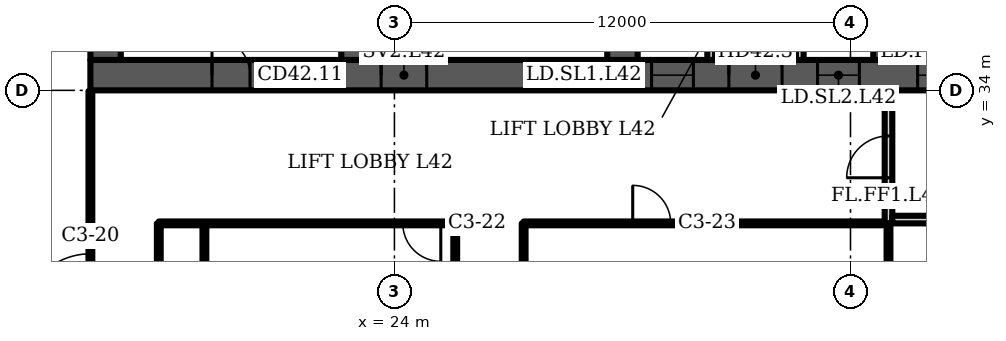
"""IFC4 building model, lengths in metres.
Left out: names, types, materials, properties, quantities, classifications, styles, units other than length and angle.
Written with IfcOpenShell. Run it as: python <this file> out.ifc"""

import sys

from ifc_helpers import new_model, si_unit, direction, frame, frame_2d, origin, place, context, subcontext, project, spatial, polyline, rectangle, outline, extrude, element, fill, save


model = new_model("IFC4")
c1 = context("Model", 3, precision=1e-05, world=origin(), true_north=direction((0.0, 1.0)))
c2 = subcontext(c1, "Body", "Model", "MODEL_VIEW")
j1 = project(units=[si_unit("LENGTHUNIT", "METRE"), si_unit("PLANEANGLEUNIT", "RADIAN")], contexts=[c1])
p1 = place(None, origin())
s1 = spatial("IfcSite", under=j1, at=p1, CompositionType="ELEMENT")
p2 = place(p1, origin())
s2 = spatial("IfcBuilding", under=s1, at=p2, CompositionType="ELEMENT")
p3 = place(p2, frame((0.0, 0.0, 173.5)))
s3 = spatial("IfcBuildingStorey", under=s2, at=p3, CompositionType="ELEMENT", Elevation=173.5)
p4 = place(p3, frame((16.0, 34.4, 0.0), z_axis=(0.0, 0.0, 1.0), x_axis=(1.0, 0.0, 0.0)))
e1 = element("IfcWall", 1, at=p4, inside=s3, PredefinedType="SHEAR", context=c2, shape_type="SweptSolid", body=[
    extrude(rectangle(XDim=42.0, YDim=0.8, at=frame_2d((21.0, 0.0))), origin(), (0.0, 0.0, 1.0), 3.6),
])
p5 = place(p4, frame((3.2, 0.0, 0.0)))
e2 = element("IfcOpeningElement", 2, at=p5, cuts=e1, PredefinedType="OPENING", context=c2, shape_type="SweptSolid", body=[
    extrude(rectangle(XDim=1.0, YDim=2.1, at=frame_2d((0.5, 1.05))), frame((0.0, 0.41, 0.0), z_axis=(0.0, -1.0, 0.0), x_axis=(1.0, 0.0, 0.0)), (0.0, 0.0, 1.0), 0.82),
])
p6 = place(p4, frame((7.65, 0.0, 0.0)))
e3 = element("IfcOpeningElement", 3, at=p6, cuts=e1, PredefinedType="OPENING", context=c2, shape_type="SweptSolid", body=[
    extrude(rectangle(XDim=1.2, YDim=2.1, at=frame_2d((0.6, 1.05))), frame((0.0, 0.41, 0.0), z_axis=(0.0, -1.0, 0.0), x_axis=(1.0, 0.0, 0.0)), (0.0, 0.0, 1.0), 0.82),
])
p7 = place(p4, frame((14.767, 0.0, 0.0)))
e4 = element("IfcOpeningElement", 4, at=p7, cuts=e1, PredefinedType="OPENING", context=c2, shape_type="SweptSolid", body=[
    extrude(rectangle(XDim=1.1, YDim=2.1, at=frame_2d((0.55, 1.05))), frame((0.0, 0.41, 0.0), z_axis=(0.0, -1.0, 0.0), x_axis=(1.0, 0.0, 0.0)), (0.0, 0.0, 1.0), 0.82),
])
p8 = place(p4, frame((19.133, 0.0, 0.0)))
e5 = element("IfcOpeningElement", 5, at=p8, cuts=e1, PredefinedType="OPENING", context=c2, shape_type="SweptSolid", body=[
    extrude(rectangle(XDim=1.1, YDim=2.1, at=frame_2d((0.55, 1.05))), frame((0.0, 0.41, 0.0), z_axis=(0.0, -1.0, 0.0), x_axis=(1.0, 0.0, 0.0)), (0.0, 0.0, 1.0), 0.82),
])
p9 = place(p4, frame((16.8, 0.0, 0.0)))
e6 = element("IfcOpeningElement", 6, at=p9, cuts=e1, PredefinedType="OPENING", context=c2, shape_type="SweptSolid", body=[
    extrude(rectangle(XDim=1.4, YDim=2.1, at=frame_2d((0.7, 1.05))), frame((0.0, 0.41, 0.0), z_axis=(0.0, -1.0, 0.0), x_axis=(1.0, 0.0, 0.0)), (0.0, 0.0, 1.0), 0.82),
])
p10 = place(p4, frame((21.767, 0.0, 0.0)))
e7 = element("IfcOpeningElement", 7, at=p10, cuts=e1, PredefinedType="OPENING", context=c2, shape_type="SweptSolid", body=[
    extrude(rectangle(XDim=1.1, YDim=2.1, at=frame_2d((0.55, 1.05))), frame((0.0, 0.41, 0.0), z_axis=(0.0, -1.0, 0.0), x_axis=(1.0, 0.0, 0.0)), (0.0, 0.0, 1.0), 0.82),
])
p11 = place(p4, frame((23.95, 0.0, 0.0)))
e8 = element("IfcOpeningElement", 8, at=p11, cuts=e1, PredefinedType="OPENING", context=c2, shape_type="SweptSolid", body=[
    extrude(rectangle(XDim=1.1, YDim=2.1, at=frame_2d((0.55, 1.05))), frame((0.0, 0.41, 0.0), z_axis=(0.0, -1.0, 0.0), x_axis=(1.0, 0.0, 0.0)), (0.0, 0.0, 1.0), 0.82),
])
p12 = place(p4, frame((26.133, 0.0, 0.0)))
e9 = element("IfcOpeningElement", 9, at=p12, cuts=e1, PredefinedType="OPENING", context=c2, shape_type="SweptSolid", body=[
    extrude(rectangle(XDim=1.1, YDim=2.1, at=frame_2d((0.55, 1.05))), frame((0.0, 0.41, 0.0), z_axis=(0.0, -1.0, 0.0), x_axis=(1.0, 0.0, 0.0)), (0.0, 0.0, 1.0), 0.82),
])
p13 = place(p4, frame((33.15, 0.0, 0.0)))
e10 = element("IfcOpeningElement", 10, at=p13, cuts=e1, PredefinedType="OPENING", context=c2, shape_type="SweptSolid", body=[
    extrude(rectangle(XDim=1.2, YDim=2.1, at=frame_2d((0.6, 1.05))), frame((0.0, 0.41, 0.0), z_axis=(0.0, -1.0, 0.0), x_axis=(1.0, 0.0, 0.0)), (0.0, 0.0, 1.0), 0.82),
])
p14 = place(p4, frame((35.817, 0.0, 0.0)))
e11 = element("IfcOpeningElement", 11, at=p14, cuts=e1, PredefinedType="OPENING", context=c2, shape_type="SweptSolid", body=[
    extrude(rectangle(XDim=1.0, YDim=2.1, at=frame_2d((0.5, 1.05))), frame((0.0, 0.41, 0.0), z_axis=(0.0, -1.0, 0.0), x_axis=(1.0, 0.0, 0.0)), (0.0, 0.0, 1.0), 0.82),
])
p15 = place(p4, frame((39.95, 0.0, 0.0)))
e12 = element("IfcOpeningElement", 12, at=p15, cuts=e1, PredefinedType="OPENING", context=c2, shape_type="SweptSolid", body=[
    extrude(rectangle(XDim=1.0, YDim=2.1, at=frame_2d((0.5, 1.05))), frame((0.0, 0.41, 0.0), z_axis=(0.0, -1.0, 0.0), x_axis=(1.0, 0.0, 0.0)), (0.0, 0.0, 1.0), 0.82),
])
p16 = place(p4, frame((37.767, 0.0, 0.0)))
e13 = element("IfcOpeningElement", 13, at=p16, cuts=e1, PredefinedType="OPENING", context=c2, shape_type="SweptSolid", body=[
    extrude(rectangle(XDim=1.4, YDim=2.1, at=frame_2d((0.7, 1.05))), frame((0.0, 0.41, 0.0), z_axis=(0.0, -1.0, 0.0), x_axis=(1.0, 0.0, 0.0)), (0.0, 0.0, 1.0), 0.82),
])
p17 = place(p3, frame((16.4, 34.8, 0.0), z_axis=(0.0, 0.0, 1.0), x_axis=(0.0, 1.0, 0.0)))
e14 = element("IfcWall", 14, at=p17, inside=s3, PredefinedType="SHEAR", context=c2, shape_type="SweptSolid", body=[
    extrude(rectangle(XDim=13.184, YDim=0.8, at=frame_2d((6.592, 0.0))), origin(), (0.0, 0.0, 1.0), 3.6),
])
p18 = place(p3, frame((23.0, 34.8, 0.0), z_axis=(0.0, 0.0, 1.0), x_axis=(0.0, 1.0, 0.0)))
e15 = element("IfcWall", 15, at=p18, inside=s3, PredefinedType="SHEAR", context=c2, shape_type="SweptSolid", body=[
    extrude(rectangle(XDim=13.762, YDim=0.8, at=frame_2d((6.881, 0.0))), origin(), (0.0, 0.0, 1.0), 3.6),
])
p19 = place(p18, frame((2.55, 0.0, 0.0)))
e16 = element("IfcOpeningElement", 16, at=p19, cuts=e15, PredefinedType="OPENING", context=c2, shape_type="SweptSolid", body=[
    extrude(rectangle(XDim=1.1, YDim=2.1, at=frame_2d((0.55, 1.05))), frame((0.0, 0.41, 0.0), z_axis=(0.0, -1.0, 0.0), x_axis=(1.0, 0.0, 0.0)), (0.0, 0.0, 1.0), 0.82),
])
p20 = place(p18, frame((10.0, 0.0, 0.0)))
e17 = element("IfcOpeningElement", 17, at=p20, cuts=e15, PredefinedType="OPENING", context=c2, shape_type="SweptSolid", body=[
    extrude(rectangle(XDim=1.0, YDim=2.1, at=frame_2d((0.5, 1.05))), frame((0.0, 0.41, 0.0), z_axis=(0.0, -1.0, 0.0), x_axis=(1.0, 0.0, 0.0)), (0.0, 0.0, 1.0), 0.82),
])
p21 = place(p3, frame((30.0, 34.8, 0.0), z_axis=(0.0, 0.0, 1.0), x_axis=(0.0, 1.0, 0.0)))
e18 = element("IfcWall", 18, at=p21, inside=s3, PredefinedType="SHEAR", context=c2, shape_type="SweptSolid", body=[
    extrude(rectangle(XDim=14.374, YDim=0.8, at=frame_2d((7.187, 0.0))), origin(), (0.0, 0.0, 1.0), 3.6),
])
p22 = place(p21, frame((3.6, 0.0, 0.0)))
e19 = element("IfcOpeningElement", 19, at=p22, cuts=e18, PredefinedType="OPENING", context=c2, shape_type="SweptSolid", body=[
    extrude(rectangle(XDim=1.1, YDim=2.1, at=frame_2d((0.55, 1.05))), frame((0.0, 0.41, 0.0), z_axis=(0.0, -1.0, 0.0), x_axis=(1.0, 0.0, 0.0)), (0.0, 0.0, 1.0), 0.82),
])
p23 = place(p3, frame((37.0, 34.8, 0.0), z_axis=(0.0, 0.0, 1.0), x_axis=(0.0, 1.0, 0.0)))
e20 = element("IfcWall", 20, at=p23, inside=s3, PredefinedType="SHEAR", context=c2, shape_type="SweptSolid", body=[
    extrude(rectangle(XDim=14.987, YDim=0.8, at=frame_2d((7.493, 0.0))), origin(), (0.0, 0.0, 1.0), 3.6),
])
p24 = place(p23, frame((11.312, 0.0, 0.0)))
e21 = element("IfcOpeningElement", 21, at=p24, cuts=e20, PredefinedType="OPENING", context=c2, shape_type="SweptSolid", body=[
    extrude(rectangle(XDim=1.0, YDim=2.1, at=frame_2d((0.5, 1.05))), frame((0.0, 0.41, 0.0), z_axis=(0.0, -1.0, 0.0), x_axis=(1.0, 0.0, 0.0)), (0.0, 0.0, 1.0), 0.82),
])
p25 = place(p23, frame((3.6, 0.0, 0.0)))
e22 = element("IfcOpeningElement", 22, at=p25, cuts=e20, PredefinedType="OPENING", context=c2, shape_type="SweptSolid", body=[
    extrude(rectangle(XDim=1.1, YDim=2.1, at=frame_2d((0.55, 1.05))), frame((0.0, 0.41, 0.0), z_axis=(0.0, -1.0, 0.0), x_axis=(1.0, 0.0, 0.0)), (0.0, 0.0, 1.0), 0.82),
])
p26 = place(p3, frame((0.0, 0.0, -0.0)))
e23 = element("IfcWall", 23, at=p26, inside=s3, PredefinedType="PARTITIONING", context=c2, shape_type="SweptSolid", body=[
    extrude(outline(polyline([(32.233, 37.65), (30.4, 37.65), (30.4, 37.85), (32.233, 37.85), (32.433, 37.85), (32.433, 34.8), (32.233, 34.8), (32.233, 37.65)])), origin(), (0.0, 0.0, 1.0), 3.2),
])
p27 = place(p3, frame((0.0, 0.0, -0.0)))
e24 = element("IfcWall", 24, at=p27, inside=s3, PredefinedType="PARTITIONING", context=c2, shape_type="SweptSolid", body=[
    extrude(outline(polyline([(34.567, 37.85), (34.767, 37.85), (36.6, 37.85), (36.6, 37.65), (34.767, 37.65), (34.767, 34.8), (34.567, 34.8), (34.567, 37.85)])), origin(), (0.0, 0.0, 1.0), 3.2),
])
p28 = place(p3, frame((0.0, 0.0, -0.0)))
e25 = element("IfcWall", 25, at=p28, inside=s3, PredefinedType="PARTITIONING", context=c2, shape_type="SweptSolid", body=[
    extrude(outline(polyline([(41.567, 37.1), (39.433, 37.1), (39.433, 34.8), (39.233, 34.8), (39.233, 37.65), (37.4, 37.65), (37.4, 37.85), (39.233, 37.85), (39.433, 37.85), (39.433, 37.3), (41.567, 37.3), (41.567, 37.55), (41.767, 37.55), (43.6, 37.55), (43.6, 37.35), (41.767, 37.35), (41.767, 34.8), (41.567, 34.8), (41.567, 37.1)])), origin(), (0.0, 0.0, 1.0), 3.2),
])
p29 = place(p3, frame((37.0, 30.5, 0.0), z_axis=(0.0, 0.0, 1.0), x_axis=(0.0, 1.0, 0.0)))
e26 = element("IfcWall", 26, at=p29, inside=s3, PredefinedType="PARTITIONING", context=c2, shape_type="SweptSolid", body=[
    extrude(rectangle(XDim=3.5, YDim=0.2, at=frame_2d((1.75, 0.0))), origin(), (0.0, 0.0, 1.0), 3.2),
])
p30 = place(p29, frame((1.2, 0.0, 0.0)))
e27 = element("IfcOpeningElement", 27, at=p30, cuts=e26, PredefinedType="OPENING", context=c2, shape_type="SweptSolid", body=[
    extrude(rectangle(XDim=1.1, YDim=2.1, at=frame_2d((0.55, 1.05))), frame((0.0, 0.11, 0.0), z_axis=(0.0, -1.0, 0.0), x_axis=(1.0, 0.0, 0.0)), (0.0, 0.0, 1.0), 0.22),
])
p31 = place(p3, frame((37.1, 30.6, 0.0), z_axis=(0.0, 0.0, 1.0), x_axis=(1.0, 0.0, 0.0)))
e28 = element("IfcWall", 28, at=p31, inside=s3, PredefinedType="PARTITIONING", context=c2, shape_type="SweptSolid", body=[
    extrude(rectangle(XDim=2.8, YDim=0.2, at=frame_2d((1.4, 0.0))), origin(), (0.0, 0.0, 1.0), 3.2),
])
p32 = place(p3, frame((16.0, 26.42, 0.0), z_axis=(0.0, 0.0, 1.0), x_axis=(0.0, 1.0, 0.0)))
e29 = element("IfcWall", 29, at=p32, inside=s3, PredefinedType="PARTITIONING", context=c2, shape_type="SweptSolid", body=[
    extrude(rectangle(XDim=7.56, YDim=0.1, at=frame_2d((3.78, 0.0))), origin(), (0.0, 0.0, 1.0), 3.2),
])
p33 = place(p32, frame((1.48, 0.0, 0.0)))
e30 = element("IfcOpeningElement", 30, at=p33, cuts=e29, PredefinedType="OPENING", context=c2, shape_type="SweptSolid", body=[
    extrude(rectangle(XDim=1.8, YDim=2.1, at=frame_2d((0.9, 1.05))), frame((0.0, 0.06, 0.0), z_axis=(0.0, -1.0, 0.0), x_axis=(1.0, 0.0, 0.0)), (0.0, 0.0, 1.0), 0.12),
])
p34 = place(p3, frame((17.8, 22.0, 0.0), z_axis=(0.0, 0.0, 1.0), x_axis=(0.0, 1.0, 0.0)))
e31 = element("IfcWall", 31, at=p34, inside=s3, PredefinedType="PARTITIONING", context=c2, shape_type="SweptSolid", body=[
    extrude(rectangle(XDim=8.5, YDim=0.1, at=frame_2d((4.25, 0.0))), origin(), (0.0, 0.0, 1.0), 3.2),
])
p35 = place(p34, frame((4.231, 0.0, 0.0)))
e32 = element("IfcOpeningElement", 32, at=p35, cuts=e31, PredefinedType="OPENING", context=c2, shape_type="SweptSolid", body=[
    extrude(rectangle(XDim=1.0, YDim=2.1, at=frame_2d((0.5, 1.05))), frame((0.0, 0.06, 0.0), z_axis=(0.0, -1.0, 0.0), x_axis=(1.0, 0.0, 0.0)), (0.0, 0.0, 1.0), 0.12),
])
p36 = place(p3, frame((17.8, 30.5, 0.0), z_axis=(0.0, 0.0, 1.0), x_axis=(1.0, 0.0, 0.0)))
e33 = element("IfcWall", 33, at=p36, inside=s3, PredefinedType="PARTITIONING", context=c2, shape_type="SweptSolid", body=[
    extrude(rectangle(XDim=7.8, YDim=0.1, at=frame_2d((3.9, 0.0))), origin(), (0.0, 0.0, 1.0), 3.2),
])
p37 = place(p36, frame((6.42, 0.0, 0.0)))
e34 = element("IfcOpeningElement", 34, at=p37, cuts=e33, PredefinedType="OPENING", context=c2, shape_type="SweptSolid", body=[
    extrude(rectangle(XDim=1.0, YDim=2.1, at=frame_2d((0.5, 1.05))), frame((0.0, 0.06, 0.0), z_axis=(0.0, -1.0, 0.0), x_axis=(1.0, 0.0, 0.0)), (0.0, 0.0, 1.0), 0.12),
])
p38 = place(p3, frame((19.0, 15.745, 0.0), z_axis=(0.0, 0.0, 1.0), x_axis=(0.0, 1.0, 0.0)))
e35 = element("IfcWall", 35, at=p38, inside=s3, PredefinedType="PARTITIONING", context=c2, shape_type="SweptSolid", body=[
    extrude(rectangle(XDim=14.755, YDim=0.1, at=frame_2d((7.377, 0.0))), origin(), (0.0, 0.0, 1.0), 3.2),
])
p39 = place(p3, frame((25.6, 14.67, 0.0), z_axis=(0.0, 0.0, 1.0), x_axis=(0.0, 1.0, 0.0)))
e36 = element("IfcWall", 36, at=p39, inside=s3, PredefinedType="PARTITIONING", context=c2, shape_type="SweptSolid", body=[
    extrude(rectangle(XDim=15.83, YDim=0.1, at=frame_2d((7.915, 0.0))), origin(), (0.0, 0.0, 1.0), 3.2),
])
p40 = place(p39, frame((3.175, 0.0, 0.0)))
e37 = element("IfcOpeningElement", 37, at=p40, cuts=e36, PredefinedType="OPENING", context=c2, shape_type="SweptSolid", body=[
    extrude(rectangle(XDim=1.0, YDim=2.1, at=frame_2d((0.5, 1.05))), frame((0.0, 0.06, 0.0), z_axis=(0.0, -1.0, 0.0), x_axis=(1.0, 0.0, 0.0)), (0.0, 0.0, 1.0), 0.12),
])
p41 = place(p39, frame((8.89, 0.0, 0.0)))
e38 = element("IfcOpeningElement", 38, at=p41, cuts=e36, PredefinedType="OPENING", context=c2, shape_type="SweptSolid", body=[
    extrude(rectangle(XDim=1.0, YDim=2.1, at=frame_2d((0.5, 1.05))), frame((0.0, 0.06, 0.0), z_axis=(0.0, -1.0, 0.0), x_axis=(1.0, 0.0, 0.0)), (0.0, 0.0, 1.0), 0.12),
])
p42 = place(p3, frame((27.4, 14.24, 0.0), z_axis=(0.0, 0.0, 1.0), x_axis=(0.0, 1.0, 0.0)))
e39 = element("IfcWall", 39, at=p42, inside=s3, PredefinedType="PARTITIONING", context=c2, shape_type="SweptSolid", body=[
    extrude(rectangle(XDim=16.26, YDim=0.1, at=frame_2d((8.13, 0.0))), origin(), (0.0, 0.0, 1.0), 3.2),
])
p43 = place(p42, frame((2.525, 0.0, 0.0)))
e40 = element("IfcOpeningElement", 40, at=p43, cuts=e39, PredefinedType="OPENING", context=c2, shape_type="SweptSolid", body=[
    extrude(rectangle(XDim=1.0, YDim=2.1, at=frame_2d((0.5, 1.05))), frame((0.0, 0.06, 0.0), z_axis=(0.0, -1.0, 0.0), x_axis=(1.0, 0.0, 0.0)), (0.0, 0.0, 1.0), 0.12),
])
p44 = place(p42, frame((5.475, 0.0, 0.0)))
e41 = element("IfcOpeningElement", 41, at=p44, cuts=e39, PredefinedType="OPENING", context=c2, shape_type="SweptSolid", body=[
    extrude(rectangle(XDim=1.0, YDim=2.1, at=frame_2d((0.5, 1.05))), frame((0.0, 0.06, 0.0), z_axis=(0.0, -1.0, 0.0), x_axis=(1.0, 0.0, 0.0)), (0.0, 0.0, 1.0), 0.12),
])
p45 = place(p42, frame((8.425, 0.0, 0.0)))
e42 = element("IfcOpeningElement", 42, at=p45, cuts=e39, PredefinedType="OPENING", context=c2, shape_type="SweptSolid", body=[
    extrude(rectangle(XDim=1.0, YDim=2.1, at=frame_2d((0.5, 1.05))), frame((0.0, 0.06, 0.0), z_axis=(0.0, -1.0, 0.0), x_axis=(1.0, 0.0, 0.0)), (0.0, 0.0, 1.0), 0.12),
])
p46 = place(p42, frame((11.38, 0.0, 0.0)))
e43 = element("IfcOpeningElement", 43, at=p46, cuts=e39, PredefinedType="OPENING", context=c2, shape_type="SweptSolid", body=[
    extrude(rectangle(XDim=1.0, YDim=2.1, at=frame_2d((0.5, 1.05))), frame((0.0, 0.06, 0.0), z_axis=(0.0, -1.0, 0.0), x_axis=(1.0, 0.0, 0.0)), (0.0, 0.0, 1.0), 0.12),
])
p47 = place(p3, frame((27.4, 30.5, 0.0), z_axis=(0.0, 0.0, 1.0), x_axis=(1.0, 0.0, 0.0)))
e44 = element("IfcWall", 44, at=p47, inside=s3, PredefinedType="PARTITIONING", context=c2, shape_type="SweptSolid", body=[
    extrude(rectangle(XDim=9.45, YDim=0.1, at=frame_2d((4.725, 0.0))), origin(), (0.0, 0.0, 1.0), 3.2),
])
p48 = place(p47, frame((2.87, 0.0, 0.0)))
e45 = element("IfcOpeningElement", 45, at=p48, cuts=e44, PredefinedType="OPENING", context=c2, shape_type="SweptSolid", body=[
    extrude(rectangle(XDim=1.0, YDim=2.1, at=frame_2d((0.5, 1.05))), frame((0.0, 0.06, 0.0), z_axis=(0.0, -1.0, 0.0), x_axis=(1.0, 0.0, 0.0)), (0.0, 0.0, 1.0), 0.12),
])
p49 = place(p3, frame((37.0, 15.745, 0.0), z_axis=(0.0, 0.0, 1.0), x_axis=(0.0, 1.0, 0.0)))
e46 = element("IfcWall", 46, at=p49, inside=s3, PredefinedType="PARTITIONING", context=c2, shape_type="SweptSolid", body=[
    extrude(rectangle(XDim=14.755, YDim=0.1, at=frame_2d((7.377, 0.0))), origin(), (0.0, 0.0, 1.0), 3.2),
])
p50 = place(p5, origin())
e47 = element("IfcDoor", 47, at=p50, inside=s3, OperationType="SINGLE_SWING_LEFT", PredefinedType="DOOR", context=c2, shape_type="SweptSolid", body=[
    extrude(rectangle(XDim=1.0, YDim=2.1, at=frame_2d((0.5, 1.05))), frame((0.0, 0.4, 0.0), z_axis=(0.0, -1.0, 0.0), x_axis=(1.0, 0.0, 0.0)), (0.0, 0.0, 1.0), 0.8),
])
fill(e2, e47)
p51 = place(p6, origin())
e48 = element("IfcDoor", 48, at=p51, inside=s3, OperationType="SINGLE_SWING_LEFT", PredefinedType="DOOR", context=c2, shape_type="SweptSolid", body=[
    extrude(rectangle(XDim=1.2, YDim=2.1, at=frame_2d((0.6, 1.05))), frame((0.0, 0.025, 0.0), z_axis=(0.0, -1.0, 0.0), x_axis=(1.0, 0.0, 0.0)), (0.0, 0.0, 1.0), 0.05),
])
fill(e3, e48)
p52 = place(p7, origin())
e49 = element("IfcDoor", 49, at=p52, inside=s3, OperationType="DOUBLE_DOOR_SLIDING", PredefinedType="DOOR", context=c2, shape_type="SweptSolid", body=[
    extrude(rectangle(XDim=1.1, YDim=2.1, at=frame_2d((0.55, 1.05))), frame((0.0, 0.025, 0.0), z_axis=(0.0, -1.0, 0.0), x_axis=(1.0, 0.0, 0.0)), (0.0, 0.0, 1.0), 0.05),
])
fill(e4, e49)
p53 = place(p8, origin())
e50 = element("IfcDoor", 50, at=p53, inside=s3, OperationType="DOUBLE_DOOR_SLIDING", PredefinedType="DOOR", context=c2, shape_type="SweptSolid", body=[
    extrude(rectangle(XDim=1.1, YDim=2.1, at=frame_2d((0.55, 1.05))), frame((0.0, 0.025, 0.0), z_axis=(0.0, -1.0, 0.0), x_axis=(1.0, 0.0, 0.0)), (0.0, 0.0, 1.0), 0.05),
])
fill(e5, e50)
p54 = place(p9, origin())
e51 = element("IfcDoor", 51, at=p54, inside=s3, OperationType="DOUBLE_DOOR_SINGLE_SWING", PredefinedType="DOOR", context=c2, shape_type="SweptSolid", body=[
    extrude(rectangle(XDim=1.4, YDim=2.1, at=frame_2d((0.7, 1.05))), frame((0.0, 0.025, 0.0), z_axis=(0.0, -1.0, 0.0), x_axis=(1.0, 0.0, 0.0)), (0.0, 0.0, 1.0), 0.05),
])
fill(e6, e51)
p55 = place(p10, origin())
e52 = element("IfcDoor", 52, at=p55, inside=s3, OperationType="DOUBLE_DOOR_SLIDING", PredefinedType="DOOR", context=c2, shape_type="SweptSolid", body=[
    extrude(rectangle(XDim=1.1, YDim=2.1, at=frame_2d((0.55, 1.05))), frame((0.0, 0.025, 0.0), z_axis=(0.0, -1.0, 0.0), x_axis=(1.0, 0.0, 0.0)), (0.0, 0.0, 1.0), 0.05),
])
fill(e7, e52)
p56 = place(p30, origin())
e53 = element("IfcDoor", 53, at=p56, inside=s3, OperationType="SINGLE_SWING_LEFT", PredefinedType="DOOR", context=c2, shape_type="SweptSolid", body=[
    extrude(rectangle(XDim=1.1, YDim=2.1, at=frame_2d((0.55, 1.05))), frame((0.0, 0.025, 0.0), z_axis=(0.0, -1.0, 0.0), x_axis=(1.0, 0.0, 0.0)), (0.0, 0.0, 1.0), 0.05),
])
fill(e27, e53)
p57 = place(p33, origin())
e54 = element("IfcDoor", 54, at=p57, inside=s3, OperationType="DOUBLE_DOOR_SINGLE_SWING", PredefinedType="DOOR", context=c2, shape_type="SweptSolid", body=[
    extrude(rectangle(XDim=1.8, YDim=2.1, at=frame_2d((0.9, 1.05))), frame((0.0, 0.025, 0.0), z_axis=(0.0, -1.0, 0.0), x_axis=(1.0, 0.0, 0.0)), (0.0, 0.0, 1.0), 0.05),
])
fill(e30, e54)
p58 = place(p37, origin())
e55 = element("IfcDoor", 55, at=p58, inside=s3, OperationType="SINGLE_SWING_RIGHT", PredefinedType="DOOR", context=c2, shape_type="SweptSolid", body=[
    extrude(rectangle(XDim=1.0, YDim=2.1, at=frame_2d((0.5, 1.05))), frame((0.0, 0.025, 0.0), z_axis=(0.0, -1.0, 0.0), x_axis=(1.0, 0.0, 0.0)), (0.0, 0.0, 1.0), 0.05),
])
fill(e34, e55)
p59 = place(p48, origin())
e56 = element("IfcDoor", 56, at=p59, inside=s3, OperationType="SINGLE_SWING_LEFT", PredefinedType="DOOR", context=c2, shape_type="SweptSolid", body=[
    extrude(rectangle(XDim=1.0, YDim=2.1, at=frame_2d((0.5, 1.05))), frame((0.0, 0.025, 0.0), z_axis=(0.0, -1.0, 0.0), x_axis=(1.0, 0.0, 0.0)), (0.0, 0.0, 1.0), 0.05),
])
fill(e45, e56)
save(model, sys.argv[1])
